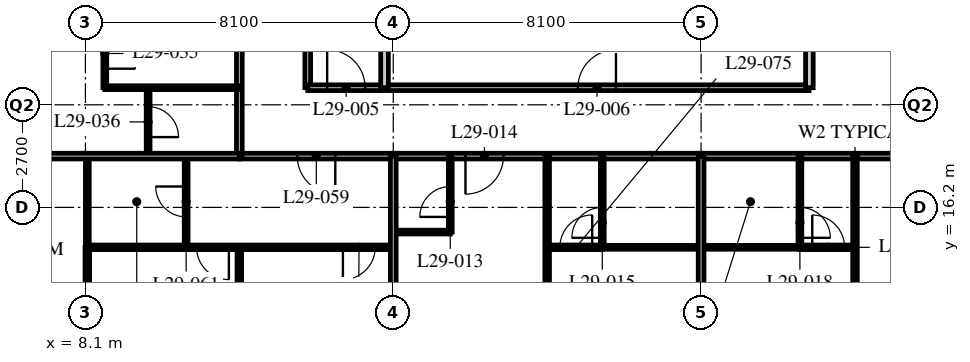
"""IFC4 building model, lengths in metres.
Left out: names, types, materials, properties, quantities, classifications, styles, units other than length and angle.
Written with IfcOpenShell. Run it as: python <this file> out.ifc"""

import sys

from ifc_helpers import new_model, si_unit, direction, frame, frame_2d, origin, place, context, subcontext, project, spatial, rectangle, extrude, element, fill, save


model = new_model("IFC4")
c1 = context("Model", 3, precision=1e-05, world=origin(), true_north=direction((0.0, 1.0)))
c2 = subcontext(c1, "Body", "Model", "MODEL_VIEW")
j1 = project(units=[si_unit("LENGTHUNIT", "METRE"), si_unit("PLANEANGLEUNIT", "RADIAN")], contexts=[c1])
p1 = place(None, origin())
s1 = spatial("IfcSite", under=j1, at=p1, CompositionType="ELEMENT")
p2 = place(p1, origin())
s2 = spatial("IfcBuilding", under=s1, at=p2, CompositionType="ELEMENT")
p3 = place(p2, frame((0.0, 0.0, 117.0)))
s3 = spatial("IfcBuildingStorey", under=s2, at=p3, CompositionType="ELEMENT", Elevation=117.0)
p4 = place(p3, frame((12.15, 17.55, 0.0), z_axis=(0.0, 0.0, 1.0), x_axis=(1.0, 0.0, 0.0)))
e1 = element("IfcWall", 1, at=p4, inside=s3, PredefinedType="PARTITIONING", context=c2, shape_type="SweptSolid", body=[
    extrude(rectangle(XDim=32.4, YDim=0.15, at=frame_2d((16.2, 0.0))), origin(), (0.0, 0.0, 1.0), 3.19),
])
p5 = place(p4, frame((5.95, 0.0, 0.0)))
e2 = element("IfcOpeningElement", 2, at=p5, cuts=e1, PredefinedType="OPENING", context=c2, shape_type="SweptSolid", body=[
    extrude(rectangle(XDim=1.0, YDim=2.1, at=frame_2d((0.5, 1.05))), frame((0.0, 0.085, 0.0), z_axis=(0.0, -1.0, 0.0), x_axis=(1.0, 0.0, 0.0)), (0.0, 0.0, 1.0), 0.17),
])
p6 = place(p4, frame((17.725, 0.0, 0.0)))
e3 = element("IfcOpeningElement", 3, at=p6, cuts=e1, PredefinedType="OPENING", context=c2, shape_type="SweptSolid", body=[
    extrude(rectangle(XDim=1.0, YDim=2.1, at=frame_2d((0.5, 1.05))), frame((0.0, 0.085, 0.0), z_axis=(0.0, -1.0, 0.0), x_axis=(1.0, 0.0, 0.0)), (0.0, 0.0, 1.0), 0.17),
])
p7 = place(p4, frame((26.75, 0.0, 0.0)))
e4 = element("IfcOpeningElement", 4, at=p7, cuts=e1, PredefinedType="OPENING", context=c2, shape_type="SweptSolid", body=[
    extrude(rectangle(XDim=1.0, YDim=2.1, at=frame_2d((0.5, 1.05))), frame((0.0, 0.085, 0.0), z_axis=(0.0, -1.0, 0.0), x_axis=(1.0, 0.0, 0.0)), (0.0, 0.0, 1.0), 0.17),
])
p8 = place(p4, frame((1.525, 0.0, 0.0)))
e5 = element("IfcOpeningElement", 5, at=p8, cuts=e1, PredefinedType="OPENING", context=c2, shape_type="SweptSolid", body=[
    extrude(rectangle(XDim=1.0, YDim=2.1, at=frame_2d((0.5, 1.05))), frame((0.0, 0.085, 0.0), z_axis=(0.0, -1.0, 0.0), x_axis=(1.0, 0.0, 0.0)), (0.0, 0.0, 1.0), 0.17),
])
p9 = place(p4, frame((29.875, 0.0, 0.0)))
e6 = element("IfcOpeningElement", 6, at=p9, cuts=e1, PredefinedType="OPENING", context=c2, shape_type="SweptSolid", body=[
    extrude(rectangle(XDim=1.0, YDim=2.1, at=frame_2d((0.5, 1.05))), frame((0.0, 0.085, 0.0), z_axis=(0.0, -1.0, 0.0), x_axis=(1.0, 0.0, 0.0)), (0.0, 0.0, 1.0), 0.17),
])
p10 = place(p3, frame((12.15, 17.55, 0.0), z_axis=(0.0, 0.0, 1.0), x_axis=(0.0, 1.0, 0.0)))
e7 = element("IfcWall", 7, at=p10, inside=s3, PredefinedType="PARTITIONING", context=c2, shape_type="SweptSolid", body=[
    extrude(rectangle(XDim=28.35, YDim=0.15, at=frame_2d((14.175, 0.0))), origin(), (0.0, 0.0, 1.0), 3.19),
])
p11 = place(p10, frame((5.45, 0.0, 0.0)))
e8 = element("IfcOpeningElement", 8, at=p11, cuts=e7, PredefinedType="OPENING", context=c2, shape_type="SweptSolid", body=[
    extrude(rectangle(XDim=1.0, YDim=2.1, at=frame_2d((0.5, 1.05))), frame((0.0, 0.085, 0.0), z_axis=(0.0, -1.0, 0.0), x_axis=(1.0, 0.0, 0.0)), (0.0, 0.0, 1.0), 0.17),
])
p12 = place(p10, frame((13.55, 0.0, 0.0)))
e9 = element("IfcOpeningElement", 9, at=p12, cuts=e7, PredefinedType="OPENING", context=c2, shape_type="SweptSolid", body=[
    extrude(rectangle(XDim=1.0, YDim=2.1, at=frame_2d((0.5, 1.05))), frame((0.0, 0.085, 0.0), z_axis=(0.0, -1.0, 0.0), x_axis=(1.0, 0.0, 0.0)), (0.0, 0.0, 1.0), 0.17),
])
p13 = place(p10, frame((21.65, 0.0, 0.0)))
e10 = element("IfcOpeningElement", 10, at=p13, cuts=e7, PredefinedType="OPENING", context=c2, shape_type="SweptSolid", body=[
    extrude(rectangle(XDim=1.0, YDim=2.1, at=frame_2d((0.5, 1.05))), frame((0.0, 0.085, 0.0), z_axis=(0.0, -1.0, 0.0), x_axis=(1.0, 0.0, 0.0)), (0.0, 0.0, 1.0), 0.17),
])
p14 = place(p10, frame((26.75, 0.0, 0.0)))
e11 = element("IfcOpeningElement", 11, at=p14, cuts=e7, PredefinedType="OPENING", context=c2, shape_type="SweptSolid", body=[
    extrude(rectangle(XDim=1.0, YDim=2.1, at=frame_2d((0.5, 1.05))), frame((0.0, 0.085, 0.0), z_axis=(0.0, -1.0, 0.0), x_axis=(1.0, 0.0, 0.0)), (0.0, 0.0, 1.0), 0.17),
])
p15 = place(p3, frame((13.95, 44.1, 0.0), z_axis=(0.0, 0.0, 1.0), x_axis=(0.0, -1.0, 0.0)))
e12 = element("IfcWall", 12, at=p15, inside=s3, PredefinedType="PARTITIONING", context=c2, shape_type="SweptSolid", body=[
    extrude(rectangle(XDim=24.75, YDim=0.15, at=frame_2d((12.375, 0.0))), origin(), (0.0, 0.0, 1.0), 3.19),
])
p16 = place(p15, frame((15.25, 0.0, 0.0)))
e13 = element("IfcOpeningElement", 13, at=p16, cuts=e12, PredefinedType="OPENING", context=c2, shape_type="SweptSolid", body=[
    extrude(rectangle(XDim=1.0, YDim=2.1, at=frame_2d((0.5, 1.05))), frame((0.0, 0.085, 0.0), z_axis=(0.0, -1.0, 0.0), x_axis=(1.0, 0.0, 0.0)), (0.0, 0.0, 1.0), 0.17),
])
p17 = place(p15, frame((7.15, 0.0, 0.0)))
e14 = element("IfcOpeningElement", 14, at=p17, cuts=e12, PredefinedType="OPENING", context=c2, shape_type="SweptSolid", body=[
    extrude(rectangle(XDim=1.0, YDim=2.1, at=frame_2d((0.5, 1.05))), frame((0.0, 0.085, 0.0), z_axis=(0.0, -1.0, 0.0), x_axis=(1.0, 0.0, 0.0)), (0.0, 0.0, 1.0), 0.17),
])
p18 = place(p3, frame((13.95, 19.35, 0.0), z_axis=(0.0, 0.0, 1.0), x_axis=(1.0, 0.0, 0.0)))
e15 = element("IfcWall", 15, at=p18, inside=s3, PredefinedType="PARTITIONING", context=c2, shape_type="SweptSolid", body=[
    extrude(rectangle(XDim=13.19, YDim=0.15, at=frame_2d((6.595, 0.0))), origin(), (0.0, 0.0, 1.0), 3.19),
])
p19 = place(p18, frame((0.51, 0.0, 0.0)))
e16 = element("IfcOpeningElement", 16, at=p19, cuts=e15, PredefinedType="OPENING", context=c2, shape_type="SweptSolid", body=[
    extrude(rectangle(XDim=1.0, YDim=2.1, at=frame_2d((0.5, 1.05))), frame((0.0, 0.085, 0.0), z_axis=(0.0, -1.0, 0.0), x_axis=(1.0, 0.0, 0.0)), (0.0, 0.0, 1.0), 0.17),
])
p20 = place(p18, frame((7.11, 0.0, 0.0)))
e17 = element("IfcOpeningElement", 17, at=p20, cuts=e15, PredefinedType="OPENING", context=c2, shape_type="SweptSolid", body=[
    extrude(rectangle(XDim=1.0, YDim=2.1, at=frame_2d((0.5, 1.05))), frame((0.0, 0.085, 0.0), z_axis=(0.0, -1.0, 0.0), x_axis=(1.0, 0.0, 0.0)), (0.0, 0.0, 1.0), 0.17),
])
p21 = place(p3, frame((15.97, 19.35, 0.0), z_axis=(0.0, 0.0, 1.0), x_axis=(0.0, 1.0, 0.0)))
e18 = element("IfcWall", 18, at=p21, inside=s3, PredefinedType="SOLIDWALL", context=c2, shape_type="SweptSolid", body=[
    extrude(rectangle(XDim=4.95, YDim=0.2, at=frame_2d((2.475, 0.0))), origin(), (0.0, 0.0, 1.0), 2.49),
])
p22 = place(p3, frame((27.15, 19.35, 0.0), z_axis=(0.0, 0.0, 1.0), x_axis=(0.0, 1.0, 0.0)))
e19 = element("IfcWall", 19, at=p22, inside=s3, PredefinedType="SOLIDWALL", context=c2, shape_type="SweptSolid", body=[
    extrude(rectangle(XDim=4.95, YDim=0.2, at=frame_2d((2.475, 0.0))), origin(), (0.0, 0.0, 1.0), 3.19),
])
p23 = place(p3, frame((16.2, 15.55, 0.0), z_axis=(0.0, 0.0, 1.0), x_axis=(1.0, 0.0, 0.0)))
e20 = element("IfcWall", 20, at=p23, inside=s3, PredefinedType="PARTITIONING", context=c2, shape_type="SweptSolid", body=[
    extrude(rectangle(XDim=1.5, YDim=0.1, at=frame_2d((0.75, 0.0))), origin(), (0.0, 0.0, 1.0), 3.19),
])
p24 = place(p3, frame((17.7, 17.55, 0.0), z_axis=(0.0, 0.0, 1.0), x_axis=(0.0, -1.0, 0.0)))
e21 = element("IfcWall", 21, at=p24, inside=s3, PredefinedType="PARTITIONING", context=c2, shape_type="SweptSolid", body=[
    extrude(rectangle(XDim=2.0, YDim=0.1, at=frame_2d((1.0, 0.0))), origin(), (0.0, 0.0, 1.0), 3.19),
])
p25 = place(p24, frame((0.8, 0.0, 0.0)))
e22 = element("IfcOpeningElement", 22, at=p25, cuts=e21, PredefinedType="OPENING", context=c2, shape_type="SweptSolid", body=[
    extrude(rectangle(XDim=0.8, YDim=2.1, at=frame_2d((0.4, 1.05))), frame((0.0, 0.06, 0.0), z_axis=(0.0, -1.0, 0.0), x_axis=(1.0, 0.0, 0.0)), (0.0, 0.0, 1.0), 0.12),
])
p26 = place(p3, frame((21.7, 15.15, 0.0), z_axis=(0.0, 0.0, 1.0), x_axis=(1.0, 0.0, 0.0)))
e23 = element("IfcWall", 23, at=p26, inside=s3, PredefinedType="PARTITIONING", context=c2, shape_type="SweptSolid", body=[
    extrude(rectangle(XDim=5.2, YDim=0.1, at=frame_2d((2.6, 0.0))), origin(), (0.0, 0.0, 1.0), 3.19),
])
p27 = place(p3, frame((21.7, 17.55, 0.0), z_axis=(0.0, 0.0, 1.0), x_axis=(0.0, -1.0, 0.0)))
e24 = element("IfcWall", 24, at=p27, inside=s3, PredefinedType="PARTITIONING", context=c2, shape_type="SweptSolid", body=[
    extrude(rectangle(XDim=2.4, YDim=0.1, at=frame_2d((1.2, 0.0))), origin(), (0.0, 0.0, 1.0), 3.19),
])
p28 = place(p27, frame((1.35, 0.0, 0.0)))
e25 = element("IfcOpeningElement", 25, at=p28, cuts=e24, PredefinedType="OPENING", context=c2, shape_type="SweptSolid", body=[
    extrude(rectangle(XDim=0.8, YDim=2.1, at=frame_2d((0.4, 1.05))), frame((0.0, 0.06, 0.0), z_axis=(0.0, -1.0, 0.0), x_axis=(1.0, 0.0, 0.0)), (0.0, 0.0, 1.0), 0.12),
])
p29 = place(p3, frame((20.25, 17.55, 0.0), z_axis=(0.0, 0.0, 1.0), x_axis=(0.0, -1.0, 0.0)))
e26 = element("IfcWall", 26, at=p29, inside=s3, PredefinedType="PARTITIONING", context=c2, shape_type="SweptSolid", body=[
    extrude(rectangle(XDim=11.85, YDim=0.12, at=frame_2d((5.925, 0.0))), origin(), (0.0, 0.0, 1.0), 3.19),
])
p30 = place(p29, frame((6.85, 0.0, 0.0)))
e27 = element("IfcOpeningElement", 27, at=p30, cuts=e26, PredefinedType="OPENING", context=c2, shape_type="SweptSolid", body=[
    extrude(rectangle(XDim=0.85, YDim=2.1, at=frame_2d((0.425, 1.05))), frame((0.0, 0.07, 0.0), z_axis=(0.0, -1.0, 0.0), x_axis=(1.0, 0.0, 0.0)), (0.0, 0.0, 1.0), 0.14),
])
p31 = place(p3, frame((24.3, 17.55, 0.0), z_axis=(0.0, 0.0, 1.0), x_axis=(0.0, -1.0, 0.0)))
e28 = element("IfcWall", 28, at=p31, inside=s3, PredefinedType="PARTITIONING", context=c2, shape_type="SweptSolid", body=[
    extrude(rectangle(XDim=11.85, YDim=0.15, at=frame_2d((5.925, 0.0))), origin(), (0.0, 0.0, 1.0), 2.578),
])
p32 = place(p3, frame((26.9, 17.55, 0.0), z_axis=(0.0, 0.0, 1.0), x_axis=(0.0, -1.0, 0.0)))
e29 = element("IfcWall", 29, at=p32, inside=s3, PredefinedType="PARTITIONING", context=c2, shape_type="SweptSolid", body=[
    extrude(rectangle(XDim=2.4, YDim=0.1, at=frame_2d((1.2, 0.0))), origin(), (0.0, 0.0, 1.0), 3.19),
])
p33 = place(p32, frame((1.35, 0.0, 0.0)))
e30 = element("IfcOpeningElement", 30, at=p33, cuts=e29, PredefinedType="OPENING", context=c2, shape_type="SweptSolid", body=[
    extrude(rectangle(XDim=0.8, YDim=2.1, at=frame_2d((0.4, 1.05))), frame((0.0, 0.06, 0.0), z_axis=(0.0, -1.0, 0.0), x_axis=(1.0, 0.0, 0.0)), (0.0, 0.0, 1.0), 0.12),
])
p34 = place(p3, frame((28.35, 17.55, 0.0), z_axis=(0.0, 0.0, 1.0), x_axis=(0.0, -1.0, 0.0)))
e31 = element("IfcWall", 31, at=p34, inside=s3, PredefinedType="PARTITIONING", context=c2, shape_type="SweptSolid", body=[
    extrude(rectangle(XDim=11.85, YDim=0.12, at=frame_2d((5.925, 0.0))), origin(), (0.0, 0.0, 1.0), 3.19),
])
p35 = place(p34, frame((6.85, 0.0, 0.0)))
e32 = element("IfcOpeningElement", 32, at=p35, cuts=e31, PredefinedType="OPENING", context=c2, shape_type="SweptSolid", body=[
    extrude(rectangle(XDim=0.85, YDim=2.1, at=frame_2d((0.425, 1.05))), frame((0.0, 0.07, 0.0), z_axis=(0.0, -1.0, 0.0), x_axis=(1.0, 0.0, 0.0)), (0.0, 0.0, 1.0), 0.14),
])
p36 = place(p3, frame((8.61, 19.35, 0.0), z_axis=(0.0, 0.0, 1.0), x_axis=(0.0, 1.0, 0.0)))
e33 = element("IfcWall", 33, at=p36, inside=s3, PredefinedType="PARTITIONING", context=c2, shape_type="SweptSolid", body=[
    extrude(rectangle(XDim=3.4, YDim=0.1, at=frame_2d((1.7, 0.0))), origin(), (0.0, 0.0, 1.0), 3.19),
])
p37 = place(p36, frame((0.5, 0.0, 0.0)))
e34 = element("IfcOpeningElement", 34, at=p37, cuts=e33, PredefinedType="OPENING", context=c2, shape_type="SweptSolid", body=[
    extrude(rectangle(XDim=0.8, YDim=2.1, at=frame_2d((0.4, 1.05))), frame((0.0, 0.06, 0.0), z_axis=(0.0, -1.0, 0.0), x_axis=(1.0, 0.0, 0.0)), (0.0, 0.0, 1.0), 0.12),
])
p38 = place(p3, frame((9.75, 17.55, 0.0), z_axis=(0.0, 0.0, 1.0), x_axis=(0.0, 1.0, 0.0)))
e35 = element("IfcWall", 35, at=p38, inside=s3, PredefinedType="PARTITIONING", context=c2, shape_type="SweptSolid", body=[
    extrude(rectangle(XDim=1.8, YDim=0.1, at=frame_2d((0.9, 0.0))), origin(), (0.0, 0.0, 1.0), 3.19),
])
p39 = place(p38, frame((0.5, 0.0, 0.0)))
e36 = element("IfcOpeningElement", 36, at=p39, cuts=e35, PredefinedType="OPENING", context=c2, shape_type="SweptSolid", body=[
    extrude(rectangle(XDim=0.8, YDim=2.1, at=frame_2d((0.4, 1.05))), frame((0.0, 0.06, 0.0), z_axis=(0.0, -1.0, 0.0), x_axis=(1.0, 0.0, 0.0)), (0.0, 0.0, 1.0), 0.12),
])
p40 = place(p3, frame((12.15, 19.35, 0.0), z_axis=(0.0, 0.0, 1.0), x_axis=(-1.0, 0.0, 0.0)))
e37 = element("IfcWall", 37, at=p40, inside=s3, PredefinedType="PARTITIONING", context=c2, shape_type="SweptSolid", body=[
    extrude(rectangle(XDim=3.54, YDim=0.1, at=frame_2d((1.77, 0.0))), origin(), (0.0, 0.0, 1.0), 3.19),
])
p41 = place(p3, frame((10.75, 17.55, 0.0), z_axis=(0.0, 0.0, 1.0), x_axis=(0.0, -1.0, 0.0)))
e38 = element("IfcWall", 38, at=p41, inside=s3, PredefinedType="PARTITIONING", context=c2, shape_type="SweptSolid", body=[
    extrude(rectangle(XDim=2.4, YDim=0.1, at=frame_2d((1.2, 0.0))), origin(), (0.0, 0.0, 1.0), 3.19),
])
p42 = place(p41, frame((0.8, 0.0, 0.0)))
e39 = element("IfcOpeningElement", 39, at=p42, cuts=e38, PredefinedType="OPENING", context=c2, shape_type="SweptSolid", body=[
    extrude(rectangle(XDim=0.8, YDim=2.1, at=frame_2d((0.4, 1.05))), frame((0.0, 0.06, 0.0), z_axis=(0.0, -1.0, 0.0), x_axis=(1.0, 0.0, 0.0)), (0.0, 0.0, 1.0), 0.12),
])
p43 = place(p3, frame((8.15, 17.55, 0.0), z_axis=(0.0, 0.0, 1.0), x_axis=(0.0, -1.0, 0.0)))
e40 = element("IfcWall", 40, at=p43, inside=s3, PredefinedType="PARTITIONING", context=c2, shape_type="SweptSolid", body=[
    extrude(rectangle(XDim=2.4, YDim=0.1, at=frame_2d((1.2, 0.0))), origin(), (0.0, 0.0, 1.0), 2.578),
])
p44 = place(p3, frame((8.15, 15.15, 0.0), z_axis=(0.0, 0.0, 1.0), x_axis=(1.0, 0.0, 0.0)))
e41 = element("IfcWall", 41, at=p44, inside=s3, PredefinedType="PARTITIONING", context=c2, shape_type="SweptSolid", body=[
    extrude(rectangle(XDim=8.05, YDim=0.12, at=frame_2d((4.025, 0.0))), origin(), (0.0, 0.0, 1.0), 3.19),
])
p45 = place(p44, frame((6.725, 0.0, 0.0)))
e42 = element("IfcOpeningElement", 42, at=p45, cuts=e41, PredefinedType="OPENING", context=c2, shape_type="SweptSolid", body=[
    extrude(rectangle(XDim=0.85, YDim=2.1, at=frame_2d((0.425, 1.05))), frame((0.0, 0.07, 0.0), z_axis=(0.0, -1.0, 0.0), x_axis=(1.0, 0.0, 0.0)), (0.0, 0.0, 1.0), 0.14),
])
p46 = place(p44, frame((2.875, 0.0, 0.0)))
e43 = element("IfcOpeningElement", 43, at=p46, cuts=e41, PredefinedType="OPENING", context=c2, shape_type="SweptSolid", body=[
    extrude(rectangle(XDim=0.85, YDim=2.1, at=frame_2d((0.425, 1.05))), frame((0.0, 0.07, 0.0), z_axis=(0.0, -1.0, 0.0), x_axis=(1.0, 0.0, 0.0)), (0.0, 0.0, 1.0), 0.14),
])
p47 = place(p3, frame((12.15, 15.15, 0.0), z_axis=(0.0, 0.0, 1.0), x_axis=(0.0, -1.0, 0.0)))
e44 = element("IfcWall", 44, at=p47, inside=s3, PredefinedType="PARTITIONING", context=c2, shape_type="SweptSolid", body=[
    extrude(rectangle(XDim=9.45, YDim=0.12, at=frame_2d((4.725, 0.0))), origin(), (0.0, 0.0, 1.0), 3.19),
])
p48 = place(p3, frame((0.3, 17.55, 0.0), z_axis=(0.0, 0.0, 1.0), x_axis=(1.0, 0.0, 0.0)))
e45 = element("IfcWall", 45, at=p48, inside=s3, PredefinedType="PARTITIONING", context=c2, shape_type="SweptSolid", body=[
    extrude(rectangle(XDim=11.85, YDim=0.15, at=frame_2d((5.925, 0.0))), origin(), (0.0, 0.0, 1.0), 3.19),
])
p49 = place(p3, frame((16.2, 17.55, 0.0), z_axis=(0.0, 0.0, 1.0), x_axis=(0.0, -1.0, 0.0)))
e46 = element("IfcWall", 46, at=p49, inside=s3, PredefinedType="PARTITIONING", context=c2, shape_type="SweptSolid", body=[
    extrude(rectangle(XDim=11.85, YDim=0.15, at=frame_2d((5.925, 0.0))), origin(), (0.0, 0.0, 1.0), 2.578),
])
p50 = place(p3, frame((21.71, 15.15, 0.0), z_axis=(0.0, 0.0, 1.0), x_axis=(-1.0, 0.0, 0.0)))
e47 = element("IfcWall", 47, at=p50, inside=s3, PredefinedType="PARTITIONING", context=c2, shape_type="SweptSolid", body=[
    extrude(rectangle(XDim=1.46, YDim=0.12, at=frame_2d((0.73, 0.0))), origin(), (0.0, 0.0, 1.0), 3.19),
])
p51 = place(p50, frame((0.275, 0.0, 0.0)))
e48 = element("IfcOpeningElement", 48, at=p51, cuts=e47, PredefinedType="OPENING", context=c2, shape_type="SweptSolid", body=[
    extrude(rectangle(XDim=0.85, YDim=2.1, at=frame_2d((0.425, 1.05))), frame((0.0, 0.07, 0.0), z_axis=(0.0, -1.0, 0.0), x_axis=(1.0, 0.0, 0.0)), (0.0, 0.0, 1.0), 0.14),
])
p52 = place(p3, frame((28.35, 15.15, 0.0), z_axis=(0.0, 0.0, 1.0), x_axis=(-1.0, 0.0, 0.0)))
e49 = element("IfcWall", 49, at=p52, inside=s3, PredefinedType="PARTITIONING", context=c2, shape_type="SweptSolid", body=[
    extrude(rectangle(XDim=1.46, YDim=0.12, at=frame_2d((0.73, 0.0))), origin(), (0.0, 0.0, 1.0), 3.19),
])
p53 = place(p52, frame((0.275, 0.0, 0.0)))
e50 = element("IfcOpeningElement", 50, at=p53, cuts=e49, PredefinedType="OPENING", context=c2, shape_type="SweptSolid", body=[
    extrude(rectangle(XDim=0.85, YDim=2.1, at=frame_2d((0.425, 1.05))), frame((0.0, 0.07, 0.0), z_axis=(0.0, -1.0, 0.0), x_axis=(1.0, 0.0, 0.0)), (0.0, 0.0, 1.0), 0.14),
])
p54 = place(p3, frame((8.15, 15.15, 0.0), z_axis=(0.0, 0.0, 1.0), x_axis=(0.0, -1.0, 0.0)))
e51 = element("IfcWall", 51, at=p54, inside=s3, PredefinedType="PARTITIONING", context=c2, shape_type="SweptSolid", body=[
    extrude(rectangle(XDim=1.2, YDim=0.12, at=frame_2d((0.6, 0.0))), origin(), (0.0, 0.0, 1.0), 2.578),
])
p55 = place(p19, origin())
e52 = element("IfcDoor", 52, at=p55, inside=s3, OperationType="SINGLE_SWING_LEFT", PredefinedType="DOOR", context=c2, shape_type="SweptSolid", body=[
    extrude(rectangle(XDim=1.0, YDim=2.1, at=frame_2d((0.5, 1.05))), frame((0.0, 0.025, 0.0), z_axis=(0.0, -1.0, 0.0), x_axis=(1.0, 0.0, 0.0)), (0.0, 0.0, 1.0), 0.05),
])
fill(e16, e52)
p56 = place(p20, origin())
e53 = element("IfcDoor", 53, at=p56, inside=s3, OperationType="SINGLE_SWING_RIGHT", PredefinedType="DOOR", context=c2, shape_type="SweptSolid", body=[
    extrude(rectangle(XDim=1.0, YDim=2.1, at=frame_2d((0.5, 1.05))), frame((0.0, 0.025, 0.0), z_axis=(0.0, -1.0, 0.0), x_axis=(1.0, 0.0, 0.0)), (0.0, 0.0, 1.0), 0.05),
])
fill(e17, e53)
p57 = place(p25, origin())
e54 = element("IfcDoor", 54, at=p57, inside=s3, OperationType="SINGLE_SWING_LEFT", PredefinedType="DOOR", context=c2, shape_type="SweptSolid", body=[
    extrude(rectangle(XDim=0.8, YDim=2.1, at=frame_2d((0.4, 1.05))), frame((0.0, 0.025, 0.0), z_axis=(0.0, -1.0, 0.0), x_axis=(1.0, 0.0, 0.0)), (0.0, 0.0, 1.0), 0.05),
])
fill(e22, e54)
p58 = place(p5, origin())
e55 = element("IfcDoor", 55, at=p58, inside=s3, OperationType="SINGLE_SWING_RIGHT", PredefinedType="DOOR", context=c2, shape_type="SweptSolid", body=[
    extrude(rectangle(XDim=1.0, YDim=2.1, at=frame_2d((0.5, 1.05))), frame((0.0, 0.025, 0.0), z_axis=(0.0, -1.0, 0.0), x_axis=(1.0, 0.0, 0.0)), (0.0, 0.0, 1.0), 0.05),
])
fill(e2, e55)
p59 = place(p28, origin())
e56 = element("IfcDoor", 56, at=p59, inside=s3, OperationType="SINGLE_SWING_LEFT", PredefinedType="DOOR", context=c2, shape_type="SweptSolid", body=[
    extrude(rectangle(XDim=0.8, YDim=2.1, at=frame_2d((0.4, 1.05))), frame((0.0, 0.025, 0.0), z_axis=(0.0, -1.0, 0.0), x_axis=(1.0, 0.0, 0.0)), (0.0, 0.0, 1.0), 0.05),
])
fill(e25, e56)
p60 = place(p33, origin())
e57 = element("IfcDoor", 57, at=p60, inside=s3, OperationType="SINGLE_SWING_RIGHT", PredefinedType="DOOR", context=c2, shape_type="SweptSolid", body=[
    extrude(rectangle(XDim=0.8, YDim=2.1, at=frame_2d((0.4, 1.05))), frame((0.0, 0.025, 0.0), z_axis=(0.0, -1.0, 0.0), x_axis=(1.0, 0.0, 0.0)), (0.0, 0.0, 1.0), 0.05),
])
fill(e30, e57)
p61 = place(p37, origin())
e58 = element("IfcDoor", 58, at=p61, inside=s3, OperationType="SINGLE_SWING_RIGHT", PredefinedType="DOOR", context=c2, shape_type="SweptSolid", body=[
    extrude(rectangle(XDim=0.8, YDim=2.1, at=frame_2d((0.4, 1.05))), frame((0.0, 0.025, 0.0), z_axis=(0.0, -1.0, 0.0), x_axis=(1.0, 0.0, 0.0)), (0.0, 0.0, 1.0), 0.05),
])
fill(e34, e58)
p62 = place(p39, origin())
e59 = element("IfcDoor", 59, at=p62, inside=s3, OperationType="SINGLE_SWING_RIGHT", PredefinedType="DOOR", context=c2, shape_type="SweptSolid", body=[
    extrude(rectangle(XDim=0.8, YDim=2.1, at=frame_2d((0.4, 1.05))), frame((0.0, 0.025, 0.0), z_axis=(0.0, -1.0, 0.0), x_axis=(1.0, 0.0, 0.0)), (0.0, 0.0, 1.0), 0.05),
])
fill(e36, e59)
p63 = place(p8, origin())
e60 = element("IfcDoor", 60, at=p63, inside=s3, OperationType="SINGLE_SWING_LEFT", PredefinedType="DOOR", context=c2, shape_type="SweptSolid", body=[
    extrude(rectangle(XDim=1.0, YDim=2.1, at=frame_2d((0.5, 1.05))), frame((0.0, 0.025, 0.0), z_axis=(0.0, -1.0, 0.0), x_axis=(1.0, 0.0, 0.0)), (0.0, 0.0, 1.0), 0.05),
])
fill(e5, e60)
p64 = place(p45, origin())
e61 = element("IfcDoor", 61, at=p64, inside=s3, OperationType="SINGLE_SWING_RIGHT", PredefinedType="DOOR", context=c2, shape_type="SweptSolid", body=[
    extrude(rectangle(XDim=0.85, YDim=2.1, at=frame_2d((0.425, 1.05))), frame((0.0, 0.025, 0.0), z_axis=(0.0, -1.0, 0.0), x_axis=(1.0, 0.0, 0.0)), (0.0, 0.0, 1.0), 0.05),
])
fill(e42, e61)
p65 = place(p42, origin())
e62 = element("IfcDoor", 62, at=p65, inside=s3, OperationType="SINGLE_SWING_RIGHT", PredefinedType="DOOR", context=c2, shape_type="SweptSolid", body=[
    extrude(rectangle(XDim=0.8, YDim=2.1, at=frame_2d((0.4, 1.05))), frame((0.0, 0.025, 0.0), z_axis=(0.0, -1.0, 0.0), x_axis=(1.0, 0.0, 0.0)), (0.0, 0.0, 1.0), 0.05),
])
fill(e39, e62)
p66 = place(p46, origin())
e63 = element("IfcDoor", 63, at=p66, inside=s3, OperationType="SINGLE_SWING_LEFT", PredefinedType="DOOR", context=c2, shape_type="SweptSolid", body=[
    extrude(rectangle(XDim=0.85, YDim=2.1, at=frame_2d((0.425, 1.05))), frame((0.0, 0.025, 0.0), z_axis=(0.0, -1.0, 0.0), x_axis=(1.0, 0.0, 0.0)), (0.0, 0.0, 1.0), 0.05),
])
fill(e43, e63)
p67 = place(p51, origin())
e64 = element("IfcDoor", 64, at=p67, inside=s3, OperationType="SINGLE_SWING_RIGHT", PredefinedType="DOOR", context=c2, shape_type="SweptSolid", body=[
    extrude(rectangle(XDim=0.85, YDim=2.1, at=frame_2d((0.425, 1.05))), frame((0.0, 0.025, 0.0), z_axis=(0.0, -1.0, 0.0), x_axis=(1.0, 0.0, 0.0)), (0.0, 0.0, 1.0), 0.05),
])
fill(e48, e64)
p68 = place(p53, origin())
e65 = element("IfcDoor", 65, at=p68, inside=s3, OperationType="SINGLE_SWING_LEFT", PredefinedType="DOOR", context=c2, shape_type="SweptSolid", body=[
    extrude(rectangle(XDim=0.85, YDim=2.1, at=frame_2d((0.425, 1.05))), frame((0.0, 0.025, 0.0), z_axis=(0.0, -1.0, 0.0), x_axis=(1.0, 0.0, 0.0)), (0.0, 0.0, 1.0), 0.05),
])
fill(e50, e65)
save(model, sys.argv[1])
